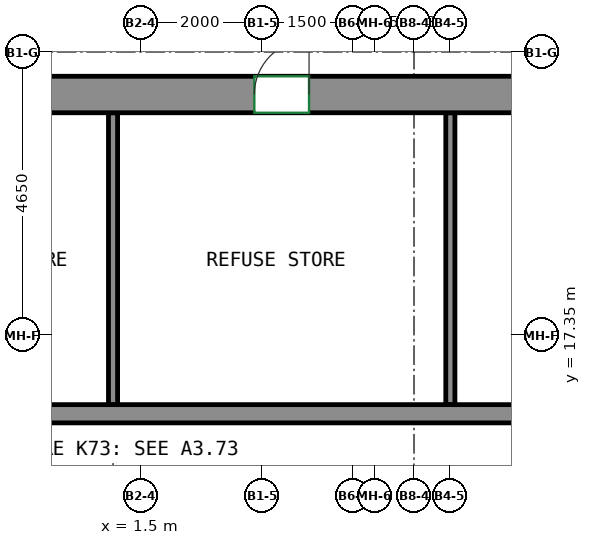
"""IFC4 building model, lengths in metres.
Left out: names, types, materials, properties, quantities, classifications, styles, units other than length and angle.
Written with IfcOpenShell. Run it as: python <this file> out.ifc"""

import sys

from ifc_helpers import new_model, si_unit, direction, frame, frame_2d, origin, place, context, subcontext, project, spatial, rectangle, extrude, source, transform, mapped, element, fill, save


model = new_model("IFC4")
c1 = context("Model", 3, precision=1e-05, world=origin(), true_north=direction((0.0, 1.0)))
c2 = subcontext(c1, "Body", "Model", "MODEL_VIEW")
j1 = project(units=[si_unit("LENGTHUNIT", "METRE"), si_unit("PLANEANGLEUNIT", "RADIAN")], contexts=[c1])
p1 = place(None, origin())
s1 = spatial("IfcSite", under=j1, at=p1, CompositionType="ELEMENT")
p2 = place(p1, origin())
s2 = spatial("IfcBuilding", under=s1, at=p2, CompositionType="ELEMENT")
p3 = place(p2, frame((0.0, 0.0, 290.8)))
s3 = spatial("IfcBuildingStorey", under=s2, at=p3, CompositionType="ELEMENT", Elevation=290.8)
m1 = source(origin(), c2, "Body", "SweptSolid", [
    extrude(rectangle(XDim=33.3, YDim=0.6, at=frame_2d((16.65, 0.0))), origin(), (0.0, 0.0, 1.0), 3.8),
])
p4 = place(p3, frame((-15.6, 21.3, 0.0), z_axis=(0.0, 0.0, 1.0), x_axis=(1.0, 0.0, 0.0)))
e1 = element("IfcWall", 1, at=p4, inside=s3, PredefinedType="SHEAR", context=c2, shape_type="MappedRepresentation", body=[
    mapped(m1, transform((0.0, 0.0, 0.0))),
])
p5 = place(p4, frame((8.12, 0.0, 0.0)))
e2 = element("IfcOpeningElement", 2, at=p5, cuts=e1, PredefinedType="OPENING", context=c2, shape_type="SweptSolid", body=[
    extrude(rectangle(XDim=0.9, YDim=2.1, at=frame_2d((0.45, 1.05))), frame((0.0, 0.31, 0.0), z_axis=(0.0, -1.0, 0.0), x_axis=(1.0, 0.0, 0.0)), (0.0, 0.0, 1.0), 0.62),
])
p6 = place(p4, frame((14.15, 0.0, 0.0)))
e3 = element("IfcOpeningElement", 3, at=p6, cuts=e1, PredefinedType="OPENING", context=c2, shape_type="SweptSolid", body=[
    extrude(rectangle(XDim=0.9, YDim=2.1, at=frame_2d((0.45, 1.05))), frame((0.0, 0.31, 0.0), z_axis=(0.0, -1.0, 0.0), x_axis=(1.0, 0.0, 0.0)), (0.0, 0.0, 1.0), 0.62),
])
p7 = place(p4, frame((18.974, 0.0, 0.0)))
e4 = element("IfcOpeningElement", 4, at=p7, cuts=e1, PredefinedType="OPENING", context=c2, shape_type="SweptSolid", body=[
    extrude(rectangle(XDim=0.9, YDim=2.1, at=frame_2d((0.45, 1.05))), frame((0.0, 0.31, 0.0), z_axis=(0.0, -1.0, 0.0), x_axis=(1.0, 0.0, 0.0)), (0.0, 0.0, 1.0), 0.62),
])
p8 = place(p4, frame((23.664, 0.0, 0.0)))
e5 = element("IfcOpeningElement", 5, at=p8, cuts=e1, PredefinedType="OPENING", context=c2, shape_type="SweptSolid", body=[
    extrude(rectangle(XDim=0.9, YDim=2.1, at=frame_2d((0.45, 1.05))), frame((0.0, 0.31, 0.0), z_axis=(0.0, -1.0, 0.0), x_axis=(1.0, 0.0, 0.0)), (0.0, 0.0, 1.0), 0.62),
])
p9 = place(p4, frame((26.92, 0.0, 0.0)))
e6 = element("IfcOpeningElement", 6, at=p9, cuts=e1, PredefinedType="OPENING", context=c2, shape_type="SweptSolid", body=[
    extrude(rectangle(XDim=0.9, YDim=2.1, at=frame_2d((0.45, 1.05))), frame((0.0, 0.31, 0.0), z_axis=(0.0, -1.0, 0.0), x_axis=(1.0, 0.0, 0.0)), (0.0, 0.0, 1.0), 0.62),
])
p10 = place(p4, frame((2.125, 0.0, 0.0)))
e7 = element("IfcOpeningElement", 7, at=p10, cuts=e1, PredefinedType="OPENING", context=c2, shape_type="SweptSolid", body=[
    extrude(rectangle(XDim=0.9, YDim=2.1, at=frame_2d((0.45, 1.05))), frame((0.0, 0.31, 0.0), z_axis=(0.0, -1.0, 0.0), x_axis=(1.0, 0.0, 0.0)), (0.0, 0.0, 1.0), 0.62),
])
p11 = place(p4, frame((30.275, 0.0, 0.0)))
e8 = element("IfcOpeningElement", 8, at=p11, cuts=e1, PredefinedType="OPENING", context=c2, shape_type="SweptSolid", body=[
    extrude(rectangle(XDim=0.9, YDim=2.1, at=frame_2d((0.45, 1.05))), frame((0.0, 0.31, 0.0), z_axis=(0.0, -1.0, 0.0), x_axis=(1.0, 0.0, 0.0)), (0.0, 0.0, 1.0), 0.62),
])
m2 = source(origin(), c2, "Body", "SweptSolid", [
    extrude(rectangle(XDim=22.08, YDim=0.3, at=frame_2d((11.04, 0.0))), origin(), (0.0, 0.0, 1.0), 3.8),
])
p12 = place(p3, frame((-11.01, 16.05, 0.0), z_axis=(0.0, 0.0, 1.0), x_axis=(1.0, 0.0, 0.0)))
e9 = element("IfcWall", 9, at=p12, inside=s3, PredefinedType="SHEAR", context=c2, shape_type="MappedRepresentation", body=[
    mapped(m2, transform((0.0, 0.0, 0.0))),
])
m3 = source(origin(), c2, "Body", "SweptSolid", [
    extrude(rectangle(XDim=4.8, YDim=0.15, at=frame_2d((2.4, 0.0))), origin(), (0.0, 0.0, 1.0), 3.8),
])
for number, where, z_axis, x_axis in (
    (10, (1.05, 16.2, 0.0), (0.0, 0.0, 1.0), (0.0, 1.0, 0.0)),
    (11, (6.598, 16.2, 0.0), (0.0, 0.0, 1.0), (0.0, 1.0, 0.0)),
):
    element("IfcWall", number, at=place(p3, frame(where, z_axis=z_axis, x_axis=x_axis)), inside=s3, PredefinedType="PARTITIONING", context=c2, shape_type="MappedRepresentation", body=[
        mapped(m3, transform((0.0, 0.0, 0.0))),
    ])
p13 = place(p7, origin())
e12 = element("IfcDoor", 12, at=p13, inside=s3, OperationType="SINGLE_SWING_RIGHT", PredefinedType="DOOR", context=c2, shape_type="SweptSolid", body=[
    extrude(rectangle(XDim=0.9, YDim=2.1, at=frame_2d((0.45, 1.05))), frame((0.0, -0.155, 0.0), z_axis=(0.0, -1.0, 0.0), x_axis=(1.0, 0.0, 0.0)), (0.0, 0.0, 1.0), 0.05),
])
fill(e4, e12)
save(model, sys.argv[1])
